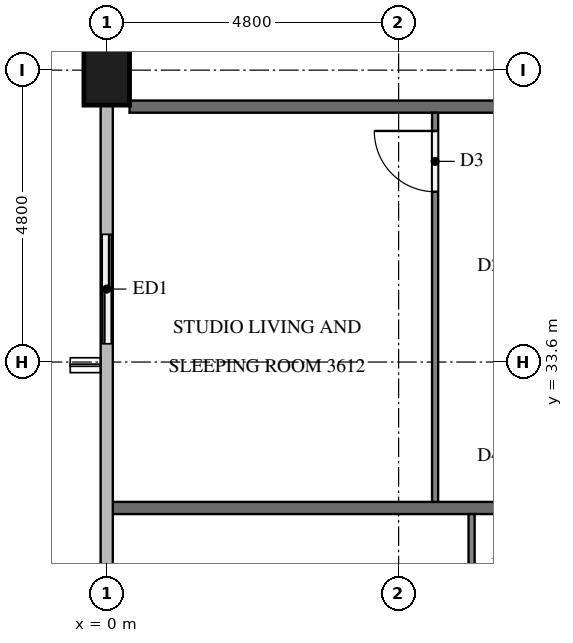
"""IFC4 building model, lengths in metres.
Left out: names, types, materials, properties, quantities, classifications, styles, units other than length and angle.
Written with IfcOpenShell. Run it as: python <this file> out.ifc"""

import sys

from ifc_helpers import new_model, si_unit, direction, frame, frame_2d, origin, origin_2d, place, context, subcontext, project, spatial, rectangle, extrude, element, fill, save


model = new_model("IFC4")
c1 = context("Model", 3, precision=1e-05, world=origin(), true_north=direction((0.0, 1.0)))
c2 = subcontext(c1, "Body", "Model", "MODEL_VIEW")
j1 = project(units=[si_unit("LENGTHUNIT", "METRE"), si_unit("PLANEANGLEUNIT", "RADIAN")], contexts=[c1])
p1 = place(None, origin())
s1 = spatial("IfcSite", under=j1, at=p1, CompositionType="ELEMENT")
p2 = place(p1, origin())
s2 = spatial("IfcBuilding", under=s1, at=p2, CompositionType="ELEMENT")
p3 = place(p2, frame((0.0, 0.0, 140.1)))
s3 = spatial("IfcBuildingStorey", under=s2, at=p3, CompositionType="ELEMENT", Elevation=140.1)
p4 = place(p3, frame((0.0, 38.4, 0.0), z_axis=(0.0, 0.0, 1.0), x_axis=(0.0, 1.0, 0.0)))
e1 = element("IfcColumn", 1, at=p4, inside=s3, PredefinedType="COLUMN", context=c2, shape_type="SweptSolid", body=[
    extrude(rectangle(XDim=1.15, YDim=0.75, at=origin_2d()), origin(), (0.0, 0.0, 1.0), 3.1),
])
p5 = place(p3, frame((0.0, 36.0, 0.0), z_axis=(0.0, 0.0, 1.0), x_axis=(0.0, -1.0, 0.0)))
e2 = element("IfcWall", 2, at=p5, inside=s3, PredefinedType="SOLIDWALL", context=c2, shape_type="SweptSolid", body=[
    extrude(rectangle(XDim=2.4, YDim=0.15, at=frame_2d((1.2, 0.0))), origin(), (0.0, 0.0, 1.0), 3.1),
])
p6 = place(p5, frame((0.3, 0.0, 0.0)))
e3 = element("IfcOpeningElement", 3, at=p6, cuts=e2, PredefinedType="OPENING", context=c2, shape_type="SweptSolid", body=[
    extrude(rectangle(XDim=1.8, YDim=2.4, at=frame_2d((0.9, 1.2))), frame((0.0, 0.085, 0.0), z_axis=(0.0, -1.0, 0.0), x_axis=(1.0, 0.0, 0.0)), (0.0, 0.0, 1.0), 0.17),
])
p7 = place(p3, frame((0.375, 37.8, 0.0), z_axis=(0.0, 0.0, 1.0), x_axis=(1.0, 0.0, 0.0)))
e4 = element("IfcWall", 4, at=p7, inside=s3, PredefinedType="PARTITIONING", context=c2, shape_type="SweptSolid", body=[
    extrude(rectangle(XDim=9.525, YDim=0.2, at=frame_2d((4.762, 0.0))), origin(), (0.0, 0.0, 1.0), 3.1),
])
p8 = place(p3, frame((0.1, 31.2, 0.0), z_axis=(0.0, 0.0, 1.0), x_axis=(1.0, 0.0, 0.0)))
e5 = element("IfcWall", 5, at=p8, inside=s3, PredefinedType="PARTITIONING", context=c2, shape_type="SweptSolid", body=[
    extrude(rectangle(XDim=9.8, YDim=0.2, at=frame_2d((4.9, 0.0))), origin(), (0.0, 0.0, 1.0), 3.1),
])
p9 = place(p3, frame((5.4, 31.3, 0.0), z_axis=(0.0, 0.0, 1.0), x_axis=(0.0, 1.0, 0.0)))
e6 = element("IfcWall", 6, at=p9, inside=s3, PredefinedType="PARTITIONING", context=c2, shape_type="SweptSolid", body=[
    extrude(rectangle(XDim=6.4, YDim=0.1, at=frame_2d((3.2, 0.0))), origin(), (0.0, 0.0, 1.0), 3.1),
])
p10 = place(p9, frame((5.1, 0.0, 0.0)))
e7 = element("IfcOpeningElement", 7, at=p10, cuts=e6, PredefinedType="OPENING", context=c2, shape_type="SweptSolid", body=[
    extrude(rectangle(XDim=1.0, YDim=2.1, at=frame_2d((0.5, 1.05))), frame((0.0, 0.06, 0.0), z_axis=(0.0, -1.0, 0.0), x_axis=(1.0, 0.0, 0.0)), (0.0, 0.0, 1.0), 0.12),
])
p11 = place(p3, frame((6.0, 15.1, 0.0), z_axis=(0.0, 0.0, 1.0), x_axis=(0.0, 1.0, 0.0)))
e8 = element("IfcWall", 8, at=p11, inside=s3, PredefinedType="PARTITIONING", context=c2, shape_type="SweptSolid", body=[
    extrude(rectangle(XDim=16.0, YDim=0.1, at=frame_2d((8.0, 0.0))), origin(), (0.0, 0.0, 1.0), 3.1),
])
p12 = place(p11, frame((9.25, 0.0, 0.0)))
e9 = element("IfcOpeningElement", 9, at=p12, cuts=e8, PredefinedType="OPENING", context=c2, shape_type="SweptSolid", body=[
    extrude(rectangle(XDim=1.0, YDim=2.1, at=frame_2d((0.5, 1.05))), frame((0.0, 0.06, 0.0), z_axis=(0.0, -1.0, 0.0), x_axis=(1.0, 0.0, 0.0)), (0.0, 0.0, 1.0), 0.12),
])
p13 = place(p11, frame((7.65, 0.0, 0.0)))
e10 = element("IfcOpeningElement", 10, at=p13, cuts=e8, PredefinedType="OPENING", context=c2, shape_type="SweptSolid", body=[
    extrude(rectangle(XDim=0.9, YDim=2.1, at=frame_2d((0.45, 1.05))), frame((0.0, 0.06, 0.0), z_axis=(0.0, -1.0, 0.0), x_axis=(1.0, 0.0, 0.0)), (0.0, 0.0, 1.0), 0.12),
])
p14 = place(p11, frame((0.3, 0.0, 0.0)))
e11 = element("IfcOpeningElement", 11, at=p14, cuts=e8, PredefinedType="OPENING", context=c2, shape_type="SweptSolid", body=[
    extrude(rectangle(XDim=0.9, YDim=2.1, at=frame_2d((0.45, 1.05))), frame((0.0, 0.06, 0.0), z_axis=(0.0, -1.0, 0.0), x_axis=(1.0, 0.0, 0.0)), (0.0, 0.0, 1.0), 0.12),
])
p15 = place(p6, origin())
e12 = element("IfcDoor", 12, at=p15, inside=s3, OperationType="SLIDING_TO_RIGHT", PredefinedType="DOOR", context=c2, shape_type="SweptSolid", body=[
    extrude(rectangle(XDim=1.8, YDim=2.4, at=frame_2d((0.9, 1.2))), frame((0.0, 0.025, 0.0), z_axis=(0.0, -1.0, 0.0), x_axis=(1.0, 0.0, 0.0)), (0.0, 0.0, 1.0), 0.05),
])
fill(e3, e12)
p16 = place(p10, origin())
e13 = element("IfcDoor", 13, at=p16, inside=s3, OperationType="SINGLE_SWING_RIGHT", PredefinedType="DOOR", context=c2, shape_type="SweptSolid", body=[
    extrude(rectangle(XDim=1.0, YDim=2.1, at=frame_2d((0.5, 1.05))), frame((0.0, 0.025, 0.0), z_axis=(0.0, -1.0, 0.0), x_axis=(1.0, 0.0, 0.0)), (0.0, 0.0, 1.0), 0.05),
])
fill(e7, e13)
save(model, sys.argv[1])
